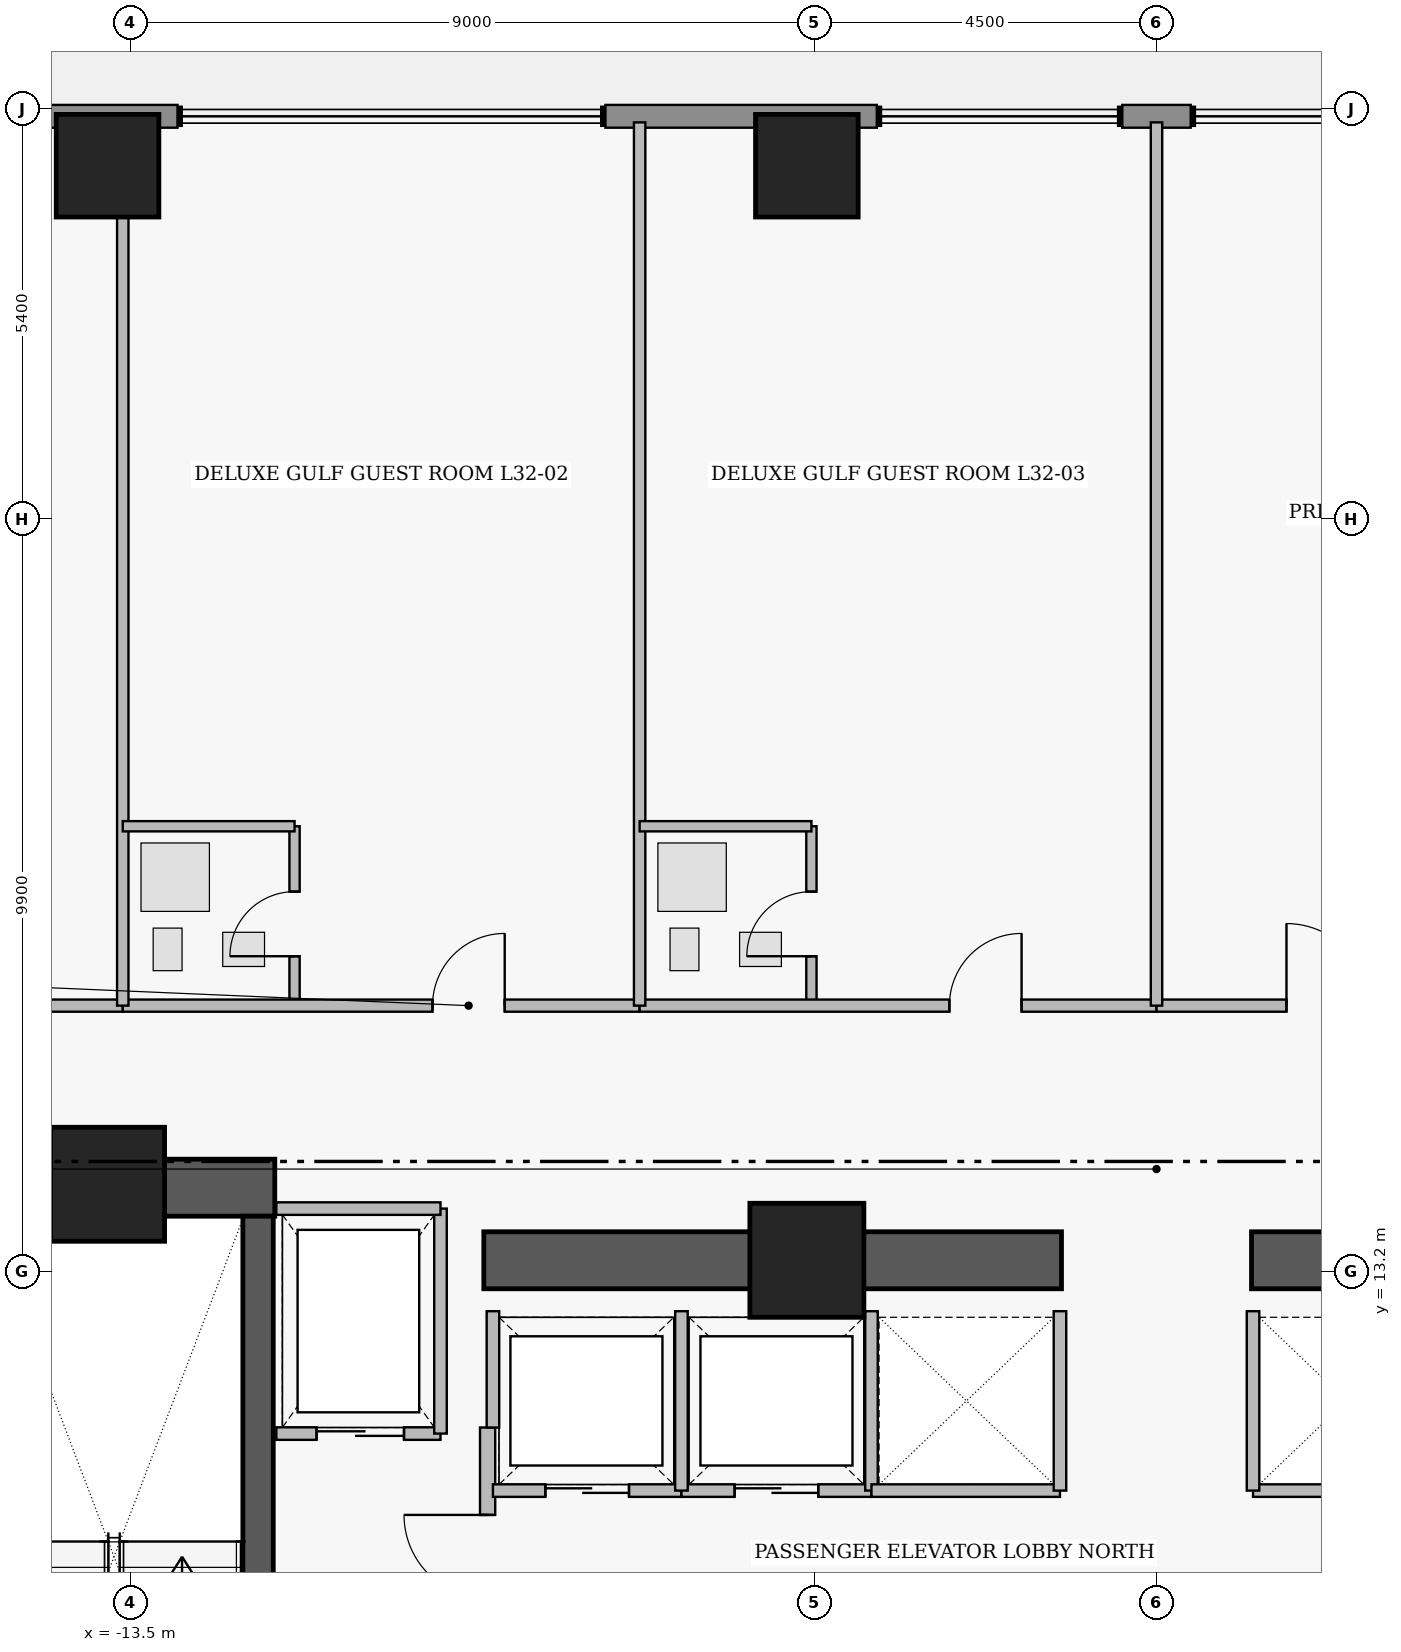
"""IFC4 building model, lengths in metres.
Left out: names, types, materials, properties, quantities, classifications, styles, units other than length and angle.
Written with IfcOpenShell. Run it as: python <this file> out.ifc"""

import sys

from ifc_helpers import new_model, si_unit, direction, frame, frame_2d, origin, origin_2d, place, context, subcontext, project, spatial, rectangle, extrude, element, fill, save


model = new_model("IFC4")
c1 = context("Model", 3, precision=1e-05, world=origin(), true_north=direction((0.0, 1.0)))
c2 = subcontext(c1, "Body", "Model", "MODEL_VIEW")
j1 = project(units=[si_unit("LENGTHUNIT", "METRE"), si_unit("PLANEANGLEUNIT", "RADIAN")], contexts=[c1])
p1 = place(None, origin())
s1 = spatial("IfcSite", under=j1, at=p1, CompositionType="ELEMENT")
p2 = place(p1, origin())
s2 = spatial("IfcBuilding", under=s1, at=p2, CompositionType="ELEMENT")
p3 = place(p2, frame((0.0, 0.0, 128.5)))
s3 = spatial("IfcBuildingStorey", under=s2, at=p3, CompositionType="ELEMENT", Elevation=128.5)
p4 = place(p3, frame((-16.16, 14.305, 0.0), z_axis=(0.0, 0.0, 1.0), x_axis=(1.0, 0.0, 0.0)))
e1 = element("IfcWall", 1, at=p4, inside=s3, PredefinedType="SHEAR", context=c2, shape_type="SweptSolid", body=[
    extrude(rectangle(XDim=4.56, YDim=0.75, at=frame_2d((2.28, 0.0))), origin(), (0.0, 0.0, 1.0), 3.46),
])
for number, where, z_axis, x_axis in (
    (2, (-8.85, 13.35, 0.0), (0.0, 0.0, 1.0), (1.0, 0.0, 0.0)),
    (3, (1.25, 13.35, 0.0), (0.0, 0.0, 1.0), (1.0, 0.0, 0.0)),
):
    element("IfcWall", number, at=place(p3, frame(where, z_axis=z_axis, x_axis=x_axis)), inside=s3, PredefinedType="SHEAR", context=c2, shape_type="SweptSolid", body=[
        extrude(rectangle(XDim=7.6, YDim=0.75, at=frame_2d((3.8, 0.0))), origin(), (0.0, 0.0, 1.0), 3.43),
    ])
p5 = place(p3, frame((-11.82, 4.97, 0.0), z_axis=(0.0, 0.0, 1.0), x_axis=(0.0, 1.0, 0.0)))
e4 = element("IfcWall", 4, at=p5, inside=s3, PredefinedType="SHEAR", context=c2, shape_type="SweptSolid", body=[
    extrude(rectangle(XDim=8.96, YDim=0.4, at=frame_2d((4.48, 0.0))), origin(), (0.0, 0.0, 1.0), 3.46),
])
p6 = place(p5, frame((0.31, 0.0, 0.0)))
e5 = element("IfcOpeningElement", 5, at=p6, cuts=e4, PredefinedType="OPENING", context=c2, shape_type="SweptSolid", body=[
    extrude(rectangle(XDim=1.12, YDim=2.22, at=frame_2d((0.56, 1.11))), frame((0.0, 0.21, 0.0), z_axis=(0.0, -1.0, 0.0), x_axis=(1.0, 0.0, 0.0)), (0.0, 0.0, 1.0), 0.42),
])
for number, where, z_axis, x_axis in (
    (6, (-13.8, 14.35, 0.0), (0.0, 0.0, 1.0), (1.0, 0.0, 0.0)),
    (7, (-4.6, 13.35, 0.0), (0.0, 0.0, 1.0), (1.0, 0.0, 0.0)),
):
    element("IfcColumn", number, at=place(p3, frame(where, z_axis=z_axis, x_axis=x_axis)), inside=s3, PredefinedType="COLUMN", context=c2, shape_type="SweptSolid", body=[
        extrude(rectangle(XDim=1.5, YDim=1.5, at=origin_2d()), origin(), (0.0, 0.0, 1.0), 3.65),
    ])
for number, where, z_axis, x_axis in (
    (8, (-13.8, 27.75, 0.0), (0.0, 0.0, 1.0), (1.0, 0.0, 0.0)),
    (9, (-4.6, 27.75, 0.0), (0.0, 0.0, 1.0), (1.0, 0.0, 0.0)),
):
    element("IfcColumn", number, at=place(p3, frame(where, z_axis=z_axis, x_axis=x_axis)), inside=s3, PredefinedType="COLUMN", context=c2, shape_type="SweptSolid", body=[
        extrude(rectangle(XDim=1.35, YDim=1.35, at=origin_2d()), origin(), (0.0, 0.0, 1.0), 3.65),
    ])
p7 = place(p3, frame((-14.72, 28.4, 0.0), z_axis=(0.0, 0.0, 1.0), x_axis=(1.0, 0.0, 0.0)))
e10 = element("IfcWall", 10, at=p7, inside=s3, PredefinedType="STANDARD", context=c2, shape_type="SweptSolid", body=[
    extrude(rectangle(XDim=1.84, YDim=0.3, at=frame_2d((0.92, 0.0))), origin(), (0.0, 0.0, 1.0), 3.43),
])
p8 = place(p3, frame((-7.25, 28.4, 0.0), z_axis=(0.0, 0.0, 1.0), x_axis=(1.0, 0.0, 0.0)))
e11 = element("IfcWall", 11, at=p8, inside=s3, PredefinedType="STANDARD", context=c2, shape_type="SweptSolid", body=[
    extrude(rectangle(XDim=3.57, YDim=0.3, at=frame_2d((1.785, 0.0))), origin(), (0.0, 0.0, 1.0), 3.43),
])
p9 = place(p3, frame((-0.45, 28.4, 0.0), z_axis=(0.0, 0.0, 1.0), x_axis=(1.0, 0.0, 0.0)))
e12 = element("IfcWall", 12, at=p9, inside=s3, PredefinedType="STANDARD", context=c2, shape_type="SweptSolid", body=[
    extrude(rectangle(XDim=0.9, YDim=0.3, at=frame_2d((0.45, 0.0))), origin(), (0.0, 0.0, 1.0), 3.43),
])
p10 = place(p3, frame((-8.8, 5.05, 0.0), z_axis=(0.0, 0.0, 1.0), x_axis=(0.0, 1.0, 0.0)))
e13 = element("IfcWall", 13, at=p10, inside=s3, PredefinedType="PARTITIONING", context=c2, shape_type="SweptSolid", body=[
    extrude(rectangle(XDim=6.1, YDim=0.2, at=frame_2d((3.05, 0.0))), origin(), (0.0, 0.0, 1.0), 3.43),
])
p11 = place(p10, frame((0.25, 0.0, 0.0)))
e14 = element("IfcOpeningElement", 14, at=p11, cuts=e13, PredefinedType="OPENING", context=c2, shape_type="SweptSolid", body=[
    extrude(rectangle(XDim=1.1, YDim=2.2, at=frame_2d((0.55, 1.1))), frame((0.0, 0.11, 0.0), z_axis=(0.0, -1.0, 0.0), x_axis=(1.0, 0.0, 0.0)), (0.0, 0.0, 1.0), 0.22),
])
p12 = place(p10, frame((3.85, 0.0, 0.0)))
e15 = element("IfcOpeningElement", 15, at=p12, cuts=e13, PredefinedType="OPENING", context=c2, shape_type="SweptSolid", body=[
    extrude(rectangle(XDim=1.1, YDim=2.2, at=frame_2d((0.55, 1.1))), frame((0.0, 0.11, 0.0), z_axis=(0.0, -1.0, 0.0), x_axis=(1.0, 0.0, 0.0)), (0.0, 0.0, 1.0), 0.22),
])
p13 = place(p3, frame((-11.58, 11.07, 0.0), z_axis=(0.0, 0.0, 1.0), x_axis=(1.0, 0.0, 0.0)))
e16 = element("IfcWall", 16, at=p13, inside=s3, PredefinedType="PARTITIONING", context=c2, shape_type="SweptSolid", body=[
    extrude(rectangle(XDim=2.16, YDim=0.165, at=frame_2d((1.08, 0.0))), origin(), (0.0, 0.0, 1.0), 3.43),
])
p14 = place(p13, frame((0.53, 0.0, 0.0)))
e17 = element("IfcOpeningElement", 17, at=p14, cuts=e16, PredefinedType="OPENING", context=c2, shape_type="SweptSolid", body=[
    extrude(rectangle(XDim=1.15, YDim=2.25, at=frame_2d((0.575, 1.125))), frame((0.0, 0.093, 0.0), z_axis=(0.0, -1.0, 0.0), x_axis=(1.0, 0.0, 0.0)), (0.0, 0.0, 1.0), 0.185),
])
p15 = place(p3, frame((-8.73, 10.32, 0.0), z_axis=(0.0, 0.0, 1.0), x_axis=(1.0, 0.0, 0.0)))
e18 = element("IfcWall", 18, at=p15, inside=s3, PredefinedType="PARTITIONING", context=c2, shape_type="SweptSolid", body=[
    extrude(rectangle(XDim=2.48, YDim=0.165, at=frame_2d((1.24, 0.0))), origin(), (0.0, 0.0, 1.0), 3.43),
])
p16 = place(p15, frame((0.69, 0.0, 0.0)))
e19 = element("IfcOpeningElement", 19, at=p16, cuts=e18, PredefinedType="OPENING", context=c2, shape_type="SweptSolid", body=[
    extrude(rectangle(XDim=1.1, YDim=2.25, at=frame_2d((0.55, 1.125))), frame((0.0, 0.093, 0.0), z_axis=(0.0, -1.0, 0.0), x_axis=(1.0, 0.0, 0.0)), (0.0, 0.0, 1.0), 0.185),
])
p17 = place(p3, frame((-6.25, 10.32, 0.0), z_axis=(0.0, 0.0, 1.0), x_axis=(1.0, 0.0, 0.0)))
e20 = element("IfcWall", 20, at=p17, inside=s3, PredefinedType="PARTITIONING", context=c2, shape_type="SweptSolid", body=[
    extrude(rectangle(XDim=2.5, YDim=0.165, at=frame_2d((1.25, 0.0))), origin(), (0.0, 0.0, 1.0), 3.43),
])
p18 = place(p17, frame((0.7, 0.0, 0.0)))
e21 = element("IfcOpeningElement", 21, at=p18, cuts=e20, PredefinedType="OPENING", context=c2, shape_type="SweptSolid", body=[
    extrude(rectangle(XDim=1.1, YDim=2.25, at=frame_2d((0.55, 1.125))), frame((0.0, 0.093, 0.0), z_axis=(0.0, -1.0, 0.0), x_axis=(1.0, 0.0, 0.0)), (0.0, 0.0, 1.0), 0.185),
])
p19 = place(p3, frame((-20.6, 16.7, 0.0), z_axis=(0.0, 0.0, 1.0), x_axis=(1.0, 0.0, 0.0)))
e22 = element("IfcWall", 22, at=p19, inside=s3, PredefinedType="PARTITIONING", context=c2, shape_type="SweptSolid", body=[
    extrude(rectangle(XDim=7.0, YDim=0.16, at=frame_2d((3.5, 0.0))), origin(), (0.0, 0.0, 1.0), 3.43),
])
p20 = place(p19, frame((4.15, 0.0, 0.0)))
e23 = element("IfcOpeningElement", 23, at=p20, cuts=e22, PredefinedType="OPENING", context=c2, shape_type="SweptSolid", body=[
    extrude(rectangle(XDim=1.0, YDim=2.15, at=frame_2d((0.5, 1.075))), frame((0.0, 0.09, 0.0), z_axis=(0.0, -1.0, 0.0), x_axis=(1.0, 0.0, 0.0)), (0.0, 0.0, 1.0), 0.18),
])
p21 = place(p3, frame((-11.34, 16.7, 0.0), z_axis=(0.0, 0.0, 1.0), x_axis=(0.0, 1.0, 0.0)))
e24 = element("IfcWall", 24, at=p21, inside=s3, PredefinedType="PLUMBINGWALL", context=c2, shape_type="SweptSolid", body=[
    extrude(rectangle(XDim=2.36, YDim=0.135, at=frame_2d((1.18, 0.0))), origin(), (0.0, 0.0, 1.0), 3.43),
])
p22 = place(p21, frame((0.65, 0.0, 0.0)))
e25 = element("IfcOpeningElement", 25, at=p22, cuts=e24, PredefinedType="OPENING", context=c2, shape_type="SweptSolid", body=[
    extrude(rectangle(XDim=0.85, YDim=2.1, at=frame_2d((0.425, 1.05))), frame((0.0, 0.077, 0.0), z_axis=(0.0, -1.0, 0.0), x_axis=(1.0, 0.0, 0.0)), (0.0, 0.0, 1.0), 0.155),
])
p23 = place(p3, frame((-13.6, 16.7, 0.0), z_axis=(0.0, 0.0, 1.0), x_axis=(1.0, 0.0, 0.0)))
e26 = element("IfcWall", 26, at=p23, inside=s3, PredefinedType="PARTITIONING", context=c2, shape_type="SweptSolid", body=[
    extrude(rectangle(XDim=6.8, YDim=0.16, at=frame_2d((3.4, 0.0))), origin(), (0.0, 0.0, 1.0), 2.973),
])
p24 = place(p23, frame((4.075, 0.0, 0.0)))
e27 = element("IfcOpeningElement", 27, at=p24, cuts=e26, PredefinedType="OPENING", context=c2, shape_type="SweptSolid", body=[
    extrude(rectangle(XDim=0.95, YDim=2.15, at=frame_2d((0.475, 1.075))), frame((0.0, 0.09, 0.0), z_axis=(0.0, -1.0, 0.0), x_axis=(1.0, 0.0, 0.0)), (0.0, 0.0, 1.0), 0.18),
])
p25 = place(p3, frame((-4.54, 16.7, 0.0), z_axis=(0.0, 0.0, 1.0), x_axis=(0.0, 1.0, 0.0)))
e28 = element("IfcWall", 28, at=p25, inside=s3, PredefinedType="PLUMBINGWALL", context=c2, shape_type="SweptSolid", body=[
    extrude(rectangle(XDim=2.36, YDim=0.135, at=frame_2d((1.18, 0.0))), origin(), (0.0, 0.0, 1.0), 2.503),
])
p26 = place(p25, frame((0.65, 0.0, 0.0)))
e29 = element("IfcOpeningElement", 29, at=p26, cuts=e28, PredefinedType="OPENING", context=c2, shape_type="SweptSolid", body=[
    extrude(rectangle(XDim=0.85, YDim=2.1, at=frame_2d((0.425, 1.05))), frame((0.0, 0.077, 0.0), z_axis=(0.0, -1.0, 0.0), x_axis=(1.0, 0.0, 0.0)), (0.0, 0.0, 1.0), 0.155),
])
p27 = place(p3, frame((-6.8, 16.7, 0.0), z_axis=(0.0, 0.0, 1.0), x_axis=(1.0, 0.0, 0.0)))
e30 = element("IfcWall", 30, at=p27, inside=s3, PredefinedType="PARTITIONING", context=c2, shape_type="SweptSolid", body=[
    extrude(rectangle(XDim=6.8, YDim=0.16, at=frame_2d((3.4, 0.0))), origin(), (0.0, 0.0, 1.0), 2.973),
])
p28 = place(p27, frame((4.075, 0.0, 0.0)))
e31 = element("IfcOpeningElement", 31, at=p28, cuts=e30, PredefinedType="OPENING", context=c2, shape_type="SweptSolid", body=[
    extrude(rectangle(XDim=0.95, YDim=2.15, at=frame_2d((0.475, 1.075))), frame((0.0, 0.09, 0.0), z_axis=(0.0, -1.0, 0.0), x_axis=(1.0, 0.0, 0.0)), (0.0, 0.0, 1.0), 0.18),
])
p29 = place(p3, frame((0.0, 16.7, 0.0), z_axis=(0.0, 0.0, 1.0), x_axis=(1.0, 0.0, 0.0)))
e32 = element("IfcWall", 32, at=p29, inside=s3, PredefinedType="PARTITIONING", context=c2, shape_type="SweptSolid", body=[
    extrude(rectangle(XDim=6.8, YDim=0.16, at=frame_2d((3.4, 0.0))), origin(), (0.0, 0.0, 1.0), 2.973),
])
p30 = place(p29, frame((1.71, 0.0, 0.0)))
e33 = element("IfcOpeningElement", 33, at=p30, cuts=e32, PredefinedType="OPENING", context=c2, shape_type="SweptSolid", body=[
    extrude(rectangle(XDim=1.08, YDim=2.18, at=frame_2d((0.54, 1.09))), frame((0.0, 0.09, 0.0), z_axis=(0.0, -1.0, 0.0), x_axis=(1.0, 0.0, 0.0)), (0.0, 0.0, 1.0), 0.18),
])
p31 = place(p3, frame((-9.42, 11.07, 0.0), z_axis=(0.0, 0.0, 1.0), x_axis=(0.0, 1.0, 0.0)))
e34 = element("IfcWall", 34, at=p31, inside=s3, PredefinedType="PARTITIONING", context=c2, shape_type="SweptSolid", body=[
    extrude(rectangle(XDim=2.96, YDim=0.165, at=frame_2d((1.48, 0.0))), origin(), (0.0, 0.0, 1.0), 3.43),
])
p32 = place(p3, frame((-11.58, 14.03, 0.0), z_axis=(0.0, 0.0, 1.0), x_axis=(1.0, 0.0, 0.0)))
e35 = element("IfcWall", 35, at=p32, inside=s3, PredefinedType="PARTITIONING", context=c2, shape_type="SweptSolid", body=[
    extrude(rectangle(XDim=2.16, YDim=0.165, at=frame_2d((1.08, 0.0))), origin(), (0.0, 0.0, 1.0), 3.43),
])
p33 = place(p3, frame((-8.73, 11.15, 0.0), z_axis=(0.0, 0.0, 1.0), x_axis=(0.0, 1.0, 0.0)))
e36 = element("IfcWall", 36, at=p33, inside=s3, PredefinedType="PARTITIONING", context=c2, shape_type="SweptSolid", body=[
    extrude(rectangle(XDim=1.53, YDim=0.165, at=frame_2d((0.765, 0.0))), origin(), (0.0, 0.0, 1.0), 3.43),
])
for number, where, z_axis, x_axis in (
    (37, (-6.25, 10.32, 0.0), (0.0, 0.0, 1.0), (0.0, 1.0, 0.0)),
    (38, (-3.75, 10.32, 0.0), (0.0, 0.0, 1.0), (0.0, 1.0, 0.0)),
):
    element("IfcWall", number, at=place(p3, frame(where, z_axis=z_axis, x_axis=x_axis)), inside=s3, PredefinedType="PARTITIONING", context=c2, shape_type="SweptSolid", body=[
        extrude(rectangle(XDim=2.36, YDim=0.165, at=frame_2d((1.18, 0.0))), origin(), (0.0, 0.0, 1.0), 3.43),
    ])
p34 = place(p3, frame((-3.75, 10.32, 0.0), z_axis=(0.0, 0.0, 1.0), x_axis=(1.0, 0.0, 0.0)))
e39 = element("IfcWall", 39, at=p34, inside=s3, PredefinedType="PARTITIONING", context=c2, shape_type="SweptSolid", body=[
    extrude(rectangle(XDim=2.48, YDim=0.165, at=frame_2d((1.24, 0.0))), origin(), (0.0, 0.0, 1.0), 3.43),
])
p35 = place(p3, frame((-1.27, 10.32, 0.0), z_axis=(0.0, 0.0, 1.0), x_axis=(0.0, 1.0, 0.0)))
e40 = element("IfcWall", 40, at=p35, inside=s3, PredefinedType="PARTITIONING", context=c2, shape_type="SweptSolid", body=[
    extrude(rectangle(XDim=2.36, YDim=0.165, at=frame_2d((1.18, 0.0))), origin(), (0.0, 0.0, 1.0), 3.43),
])
p36 = place(p3, frame((1.27, 10.32, 0.0), z_axis=(0.0, 0.0, 1.0), x_axis=(1.0, 0.0, 0.0)))
e41 = element("IfcWall", 41, at=p36, inside=s3, PredefinedType="PARTITIONING", context=c2, shape_type="SweptSolid", body=[
    extrude(rectangle(XDim=2.48, YDim=0.165, at=frame_2d((1.24, 0.0))), origin(), (0.0, 0.0, 1.0), 3.43),
])
p37 = place(p3, frame((1.27, 10.32, 0.0), z_axis=(0.0, 0.0, 1.0), x_axis=(0.0, 1.0, 0.0)))
e42 = element("IfcWall", 42, at=p37, inside=s3, PredefinedType="PARTITIONING", context=c2, shape_type="SweptSolid", body=[
    extrude(rectangle(XDim=2.36, YDim=0.165, at=frame_2d((1.18, 0.0))), origin(), (0.0, 0.0, 1.0), 3.43),
])
p38 = place(p3, frame((-13.6, 16.7, 0.0), z_axis=(0.0, 0.0, 1.0), x_axis=(0.0, 1.0, 0.0)))
e43 = element("IfcWall", 43, at=p38, inside=s3, PredefinedType="PARTITIONING", context=c2, shape_type="SweptSolid", body=[
    extrude(rectangle(XDim=11.62, YDim=0.15, at=frame_2d((5.81, 0.0))), origin(), (0.0, 0.0, 1.0), 2.503),
])
p39 = place(p3, frame((-13.6, 19.06, 0.0), z_axis=(0.0, 0.0, 1.0), x_axis=(1.0, 0.0, 0.0)))
e44 = element("IfcWall", 44, at=p39, inside=s3, PredefinedType="PLUMBINGWALL", context=c2, shape_type="SweptSolid", body=[
    extrude(rectangle(XDim=2.26, YDim=0.135, at=frame_2d((1.13, 0.0))), origin(), (0.0, 0.0, 1.0), 2.973),
])
p40 = place(p3, frame((-6.8, 16.7, 0.0), z_axis=(0.0, 0.0, 1.0), x_axis=(0.0, 1.0, 0.0)))
e45 = element("IfcWall", 45, at=p40, inside=s3, PredefinedType="PARTITIONING", context=c2, shape_type="SweptSolid", body=[
    extrude(rectangle(XDim=11.62, YDim=0.15, at=frame_2d((5.81, 0.0))), origin(), (0.0, 0.0, 1.0), 3.43),
])
p41 = place(p3, frame((-6.8, 19.06, 0.0), z_axis=(0.0, 0.0, 1.0), x_axis=(1.0, 0.0, 0.0)))
e46 = element("IfcWall", 46, at=p41, inside=s3, PredefinedType="PLUMBINGWALL", context=c2, shape_type="SweptSolid", body=[
    extrude(rectangle(XDim=2.26, YDim=0.135, at=frame_2d((1.13, 0.0))), origin(), (0.0, 0.0, 1.0), 2.973),
])
p42 = place(p3, frame((0.0, 16.7, 0.0), z_axis=(0.0, 0.0, 1.0), x_axis=(0.0, 1.0, 0.0)))
e47 = element("IfcWall", 47, at=p42, inside=s3, PredefinedType="PARTITIONING", context=c2, shape_type="SweptSolid", body=[
    extrude(rectangle(XDim=11.62, YDim=0.15, at=frame_2d((5.81, 0.0))), origin(), (0.0, 0.0, 1.0), 3.43),
])
p43 = place(p12, origin())
e48 = element("IfcDoor", 48, at=p43, inside=s3, OperationType="SINGLE_SWING_RIGHT", PredefinedType="DOOR", context=c2, shape_type="SweptSolid", body=[
    extrude(rectangle(XDim=1.1, YDim=2.2, at=frame_2d((0.55, 1.1))), frame((0.0, 0.025, 0.0), z_axis=(0.0, -1.0, 0.0), x_axis=(1.0, 0.0, 0.0)), (0.0, 0.0, 1.0), 0.05),
])
fill(e15, e48)
p44 = place(p14, origin())
e49 = element("IfcDoor", 49, at=p44, inside=s3, OperationType="SLIDING_TO_LEFT", PredefinedType="DOOR", context=c2, shape_type="SweptSolid", body=[
    extrude(rectangle(XDim=1.15, YDim=2.25, at=frame_2d((0.575, 1.125))), frame((0.0, 0.025, 0.0), z_axis=(0.0, -1.0, 0.0), x_axis=(1.0, 0.0, 0.0)), (0.0, 0.0, 1.0), 0.05),
])
fill(e17, e49)
p45 = place(p16, origin())
e50 = element("IfcDoor", 50, at=p45, inside=s3, OperationType="SLIDING_TO_LEFT", PredefinedType="DOOR", context=c2, shape_type="SweptSolid", body=[
    extrude(rectangle(XDim=1.1, YDim=2.25, at=frame_2d((0.55, 1.125))), frame((0.0, 0.025, 0.0), z_axis=(0.0, -1.0, 0.0), x_axis=(1.0, 0.0, 0.0)), (0.0, 0.0, 1.0), 0.05),
])
fill(e19, e50)
p46 = place(p18, origin())
e51 = element("IfcDoor", 51, at=p46, inside=s3, OperationType="SLIDING_TO_LEFT", PredefinedType="DOOR", context=c2, shape_type="SweptSolid", body=[
    extrude(rectangle(XDim=1.1, YDim=2.25, at=frame_2d((0.55, 1.125))), frame((0.0, 0.025, 0.0), z_axis=(0.0, -1.0, 0.0), x_axis=(1.0, 0.0, 0.0)), (0.0, 0.0, 1.0), 0.05),
])
fill(e21, e51)
p47 = place(p22, origin())
e52 = element("IfcDoor", 52, at=p47, inside=s3, OperationType="SINGLE_SWING_LEFT", PredefinedType="DOOR", context=c2, shape_type="SweptSolid", body=[
    extrude(rectangle(XDim=0.85, YDim=2.1, at=frame_2d((0.425, 1.05))), frame((0.0, 0.025, 0.0), z_axis=(0.0, -1.0, 0.0), x_axis=(1.0, 0.0, 0.0)), (0.0, 0.0, 1.0), 0.05),
])
fill(e25, e52)
p48 = place(p24, origin())
e53 = element("IfcDoor", 53, at=p48, inside=s3, OperationType="SINGLE_SWING_RIGHT", PredefinedType="DOOR", context=c2, shape_type="SweptSolid", body=[
    extrude(rectangle(XDim=0.95, YDim=2.15, at=frame_2d((0.475, 1.075))), frame((0.0, 0.025, 0.0), z_axis=(0.0, -1.0, 0.0), x_axis=(1.0, 0.0, 0.0)), (0.0, 0.0, 1.0), 0.05),
])
fill(e27, e53)
p49 = place(p26, origin())
e54 = element("IfcDoor", 54, at=p49, inside=s3, OperationType="SINGLE_SWING_LEFT", PredefinedType="DOOR", context=c2, shape_type="SweptSolid", body=[
    extrude(rectangle(XDim=0.85, YDim=2.1, at=frame_2d((0.425, 1.05))), frame((0.0, 0.025, 0.0), z_axis=(0.0, -1.0, 0.0), x_axis=(1.0, 0.0, 0.0)), (0.0, 0.0, 1.0), 0.05),
])
fill(e29, e54)
p50 = place(p28, origin())
e55 = element("IfcDoor", 55, at=p50, inside=s3, OperationType="SINGLE_SWING_RIGHT", PredefinedType="DOOR", context=c2, shape_type="SweptSolid", body=[
    extrude(rectangle(XDim=0.95, YDim=2.15, at=frame_2d((0.475, 1.075))), frame((0.0, 0.025, 0.0), z_axis=(0.0, -1.0, 0.0), x_axis=(1.0, 0.0, 0.0)), (0.0, 0.0, 1.0), 0.05),
])
fill(e31, e55)
p51 = place(p30, origin())
e56 = element("IfcDoor", 56, at=p51, inside=s3, OperationType="SINGLE_SWING_LEFT", PredefinedType="DOOR", context=c2, shape_type="SweptSolid", body=[
    extrude(rectangle(XDim=1.08, YDim=2.18, at=frame_2d((0.54, 1.09))), frame((0.0, 0.025, 0.0), z_axis=(0.0, -1.0, 0.0), x_axis=(1.0, 0.0, 0.0)), (0.0, 0.0, 1.0), 0.05),
])
fill(e33, e56)
save(model, sys.argv[1])
